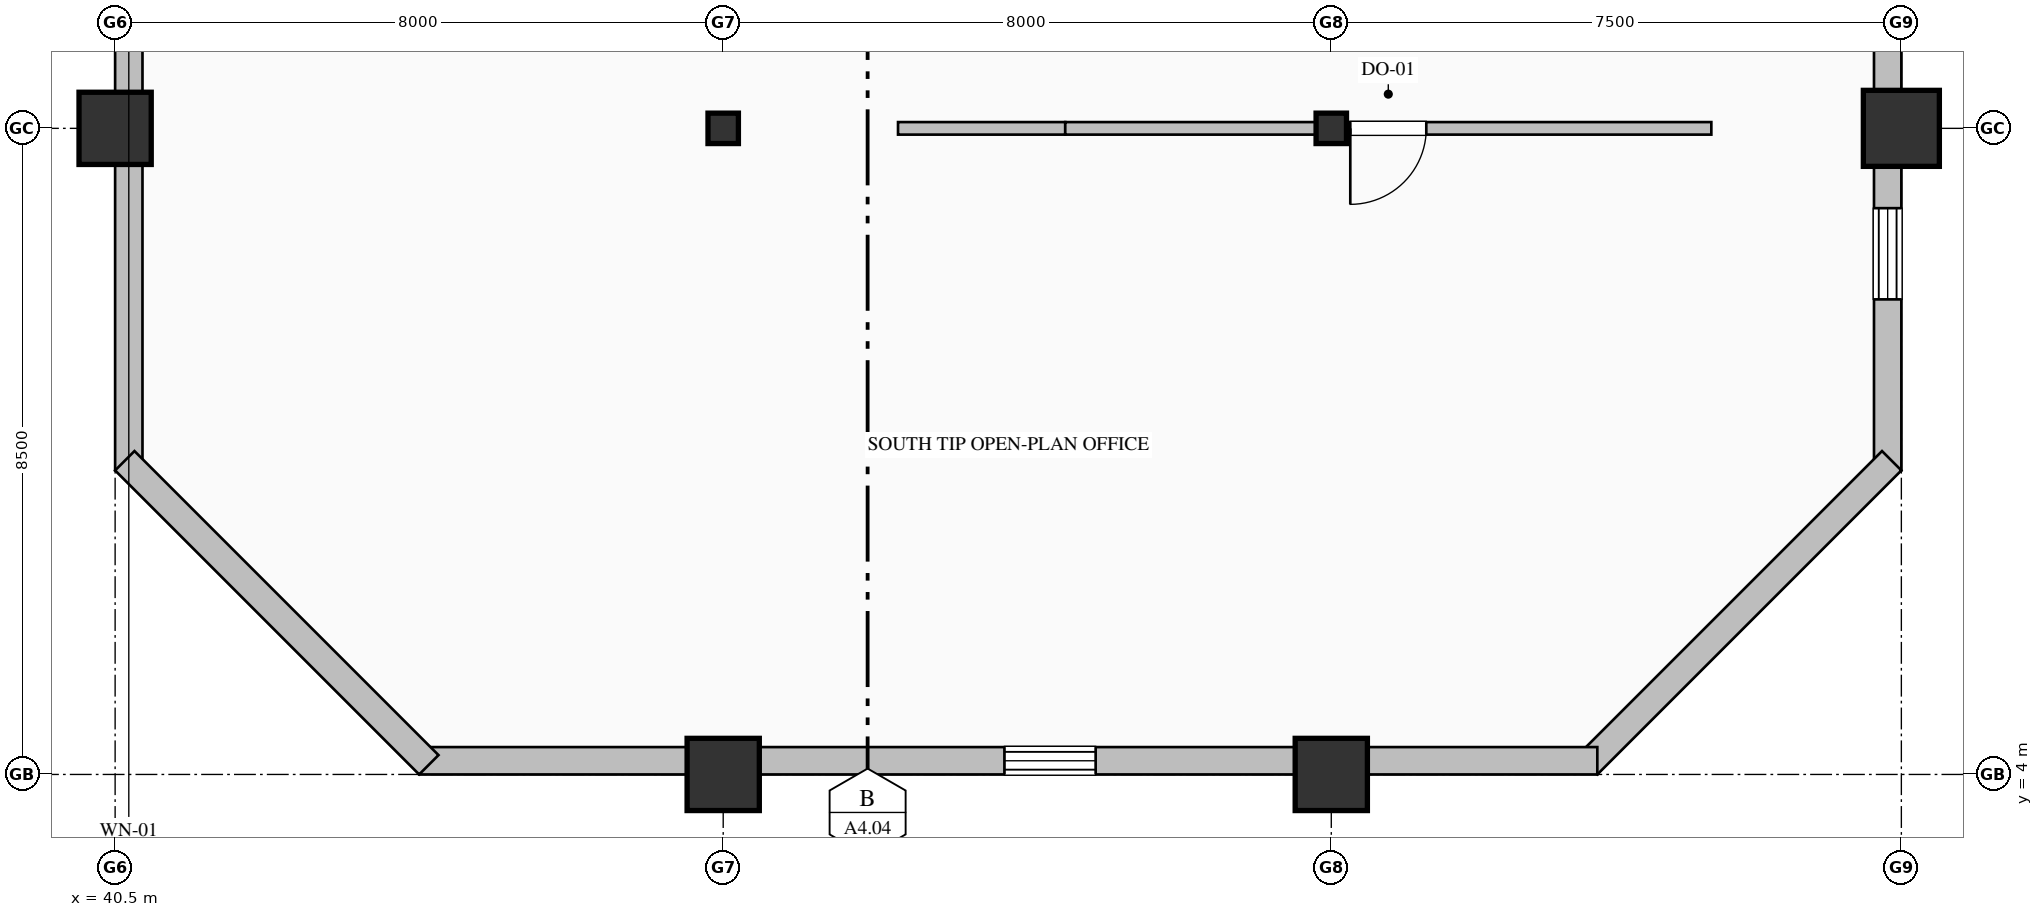
"""IFC4 building model, lengths in metres.
Left out: names, types, materials, properties, quantities, classifications, styles, units other than length and angle.
Written with IfcOpenShell. Run it as: python <this file> out.ifc"""

import sys

from ifc_helpers import new_model, si_unit, direction, frame, frame_2d, origin, origin_2d, place, context, subcontext, project, spatial, rectangle, hollow_rectangle, hollow_circle, i_section, extrude, element, fill, save


model = new_model("IFC4")
c1 = context("Model", 3, precision=1e-05, world=origin(), true_north=direction((0.0, 1.0)))
c2 = subcontext(c1, "Body", "Model", "MODEL_VIEW")
j1 = project(units=[si_unit("LENGTHUNIT", "METRE"), si_unit("PLANEANGLEUNIT", "RADIAN")], contexts=[c1])
p1 = place(None, origin())
s1 = spatial("IfcSite", under=j1, at=p1, CompositionType="ELEMENT")
p2 = place(p1, origin())
s2 = spatial("IfcBuilding", under=s1, at=p2, CompositionType="ELEMENT")
p3 = place(p2, frame((0.0, 0.0, 171.0)))
s3 = spatial("IfcBuildingStorey", under=s2, at=p3, CompositionType="ELEMENT", Elevation=171.0)
for number, where, z_axis, x_axis in (
    (1, (40.5, 12.5, 0.0), (0.0, 0.0, 1.0), (1.0, 0.0, 0.0)),
    (2, (48.5, 4.0, 0.0), (0.0, 0.0, 1.0), (1.0, 0.0, 0.0)),
):
    element("IfcColumn", number, at=place(p3, frame(where, z_axis=z_axis, x_axis=x_axis)), inside=s3, PredefinedType="COLUMN", context=c2, shape_type="SweptSolid", body=[
        extrude(hollow_rectangle(XDim=0.95, YDim=0.95, WallThickness=0.036, at=origin_2d()), origin(), (0.0, 0.0, 1.0), 4.0),
    ])
p4 = place(p3, frame((48.5, 12.5, 0.0), z_axis=(0.0, 0.0, 1.0), x_axis=(1.0, 0.0, 0.0)))
e3 = element("IfcColumn", 3, at=p4, inside=s3, PredefinedType="COLUMN", context=c2, shape_type="SweptSolid", body=[
    extrude(i_section(OverallWidth=0.4, OverallDepth=0.4, WebThickness=0.013, FlangeThickness=0.021, FilletRadius=0.022, at=origin_2d()), origin(), (0.0, 0.0, 1.0), 4.0),
])
p5 = place(p3, frame((56.5, 4.0, 0.0), z_axis=(0.0, 0.0, 1.0), x_axis=(1.0, 0.0, 0.0)))
e4 = element("IfcColumn", 4, at=p5, inside=s3, PredefinedType="COLUMN", context=c2, shape_type="SweptSolid", body=[
    extrude(hollow_rectangle(XDim=0.95, YDim=0.95, WallThickness=0.036, at=origin_2d()), origin(), (0.0, 0.0, 1.0), 4.0),
])
p6 = place(p3, frame((56.5, 12.5, 0.0), z_axis=(0.0, 0.0, 1.0), x_axis=(1.0, 0.0, 0.0)))
e5 = element("IfcColumn", 5, at=p6, inside=s3, PredefinedType="COLUMN", context=c2, shape_type="SweptSolid", body=[
    extrude(i_section(OverallWidth=0.4, OverallDepth=0.4, WebThickness=0.013, FlangeThickness=0.021, FilletRadius=0.022, at=origin_2d()), origin(), (0.0, 0.0, 1.0), 4.0),
])
p7 = place(p3, frame((64.0, 12.5, 0.0), z_axis=(0.0, 0.0, 1.0), x_axis=(1.0, 0.0, 0.0)))
e6 = element("IfcColumn", 6, at=p7, inside=s3, PredefinedType="COLUMN", context=c2, shape_type="SweptSolid", body=[
    extrude(hollow_circle(Radius=0.5, WallThickness=0.036, at=origin_2d()), origin(), (0.0, 0.0, 1.0), 4.0),
])
p8 = place(p3, frame((40.68, 8.0, 0.0), z_axis=(0.0, 0.0, 1.0), x_axis=(0.0, 1.0, 0.0)))
e7 = element("IfcWall", 7, at=p8, inside=s3, PredefinedType="SOLIDWALL", context=c2, shape_type="SweptSolid", body=[
    extrude(rectangle(XDim=20.36, YDim=0.36, at=frame_2d((10.18, 0.0))), origin(), (0.0, 0.0, 1.0), 3.165),
])
p9 = place(p8, frame((13.8, 0.0, 0.7)))
e8 = element("IfcOpeningElement", 8, at=p9, cuts=e7, PredefinedType="OPENING", context=c2, shape_type="SweptSolid", body=[
    extrude(rectangle(XDim=1.2, YDim=1.85, at=frame_2d((0.6, 0.925))), frame((0.0, 0.19, 0.0), z_axis=(0.0, -1.0, 0.0), x_axis=(1.0, 0.0, 0.0)), (0.0, 0.0, 1.0), 0.38),
])
p10 = place(p3, frame((63.82, 36.05, 0.0), z_axis=(0.0, 0.0, 1.0), x_axis=(0.0, -1.0, 0.0)))
e9 = element("IfcWall", 9, at=p10, inside=s3, PredefinedType="SOLIDWALL", context=c2, shape_type="SweptSolid", body=[
    extrude(rectangle(XDim=28.05, YDim=0.36, at=frame_2d((14.025, 0.0))), origin(), (0.0, 0.0, 1.0), 3.265),
])
p11 = place(p10, frame((3.0, 0.0, 0.7)))
e10 = element("IfcOpeningElement", 10, at=p11, cuts=e9, PredefinedType="OPENING", context=c2, shape_type="SweptSolid", body=[
    extrude(rectangle(XDim=1.2, YDim=1.85, at=frame_2d((0.6, 0.925))), frame((0.0, 0.19, 0.0), z_axis=(0.0, -1.0, 0.0), x_axis=(1.0, 0.0, 0.0)), (0.0, 0.0, 1.0), 0.38),
])
p12 = place(p10, frame((13.8, 0.0, 0.7)))
e11 = element("IfcOpeningElement", 11, at=p12, cuts=e9, PredefinedType="OPENING", context=c2, shape_type="SweptSolid", body=[
    extrude(rectangle(XDim=1.2, YDim=1.85, at=frame_2d((0.6, 0.925))), frame((0.0, 0.19, 0.0), z_axis=(0.0, -1.0, 0.0), x_axis=(1.0, 0.0, 0.0)), (0.0, 0.0, 1.0), 0.38),
])
p13 = place(p10, frame((24.6, 0.0, 0.7)))
e12 = element("IfcOpeningElement", 12, at=p13, cuts=e9, PredefinedType="OPENING", context=c2, shape_type="SweptSolid", body=[
    extrude(rectangle(XDim=1.2, YDim=1.85, at=frame_2d((0.6, 0.925))), frame((0.0, 0.19, 0.0), z_axis=(0.0, -1.0, 0.0), x_axis=(1.0, 0.0, 0.0)), (0.0, 0.0, 1.0), 0.38),
])
p14 = place(p3, frame((63.873, 8.127, 0.0), z_axis=(0.0, 0.0, 1.0), x_axis=(-0.707106781187, -0.707106781187, 0.0)))
e13 = element("IfcWall", 13, at=p14, inside=s3, PredefinedType="SOLIDWALL", context=c2, shape_type="SweptSolid", body=[
    extrude(rectangle(XDim=5.657, YDim=0.36, at=frame_2d((2.828, 0.0))), origin(), (0.0, 0.0, 1.0), 3.765),
])
p15 = place(p3, frame((60.0, 4.18, 0.0), z_axis=(0.0, 0.0, 1.0), x_axis=(-1.0, 0.0, 0.0)))
e14 = element("IfcWall", 14, at=p15, inside=s3, PredefinedType="SOLIDWALL", context=c2, shape_type="SweptSolid", body=[
    extrude(rectangle(XDim=15.5, YDim=0.36, at=frame_2d((7.75, 0.0))), origin(), (0.0, 0.0, 1.0), 3.265),
])
p16 = place(p15, frame((6.6, 0.0, 0.7)))
e15 = element("IfcOpeningElement", 15, at=p16, cuts=e14, PredefinedType="OPENING", context=c2, shape_type="SweptSolid", body=[
    extrude(rectangle(XDim=1.2, YDim=1.85, at=frame_2d((0.6, 0.925))), frame((0.0, 0.19, 0.0), z_axis=(0.0, -1.0, 0.0), x_axis=(1.0, 0.0, 0.0)), (0.0, 0.0, 1.0), 0.38),
])
p17 = place(p3, frame((44.627, 4.127, 0.0), z_axis=(0.0, 0.0, 1.0), x_axis=(-0.707106781187, 0.707106781187, 0.0)))
e16 = element("IfcWall", 16, at=p17, inside=s3, PredefinedType="SOLIDWALL", context=c2, shape_type="SweptSolid", body=[
    extrude(rectangle(XDim=5.657, YDim=0.36, at=frame_2d((2.828, 0.0))), origin(), (0.0, 0.0, 1.0), 3.765),
])
p18 = place(p3, frame((53.0, 12.5, 0.0), z_axis=(0.0, 0.0, 1.0), x_axis=(-1.0, 0.0, 0.0)))
e17 = element("IfcWall", 17, at=p18, inside=s3, PredefinedType="PARTITIONING", context=c2, shape_type="SweptSolid", body=[
    extrude(rectangle(XDim=2.2, YDim=0.165, at=frame_2d((1.1, 0.0))), origin(), (0.0, 0.0, 1.0), 3.157),
])
p19 = place(p3, frame((61.5, 12.5, 0.0), z_axis=(0.0, 0.0, 1.0), x_axis=(-1.0, 0.0, 0.0)))
e18 = element("IfcWall", 18, at=p19, inside=s3, PredefinedType="PARTITIONING", context=c2, shape_type="SweptSolid", body=[
    extrude(rectangle(XDim=8.5, YDim=0.165, at=frame_2d((4.25, 0.0))), origin(), (0.0, 0.0, 1.0), 3.157),
])
p20 = place(p19, frame((3.75, 0.0, 0.0)))
e19 = element("IfcOpeningElement", 19, at=p20, cuts=e18, PredefinedType="OPENING", context=c2, shape_type="SweptSolid", body=[
    extrude(rectangle(XDim=1.0, YDim=2.15, at=frame_2d((0.5, 1.075))), frame((0.0, 0.093, 0.0), z_axis=(0.0, -1.0, 0.0), x_axis=(1.0, 0.0, 0.0)), (0.0, 0.0, 1.0), 0.185),
])
p21 = place(p13, origin())
e20 = element("IfcWindow", 20, at=p21, inside=s3, PartitioningType="DOUBLE_PANEL_VERTICAL", PredefinedType="WINDOW", context=c2, shape_type="SweptSolid", body=[
    extrude(rectangle(XDim=1.2, YDim=1.85, at=frame_2d((0.6, 0.925))), frame((0.0, 0.15, 0.0), z_axis=(0.0, -1.0, 0.0), x_axis=(1.0, 0.0, 0.0)), (0.0, 0.0, 1.0), 0.06),
])
fill(e12, e20)
p22 = place(p16, origin())
e21 = element("IfcWindow", 21, at=p22, inside=s3, PartitioningType="DOUBLE_PANEL_VERTICAL", PredefinedType="WINDOW", context=c2, shape_type="SweptSolid", body=[
    extrude(rectangle(XDim=1.2, YDim=1.85, at=frame_2d((0.6, 0.925))), frame((0.0, 0.15, 0.0), z_axis=(0.0, -1.0, 0.0), x_axis=(1.0, 0.0, 0.0)), (0.0, 0.0, 1.0), 0.06),
])
fill(e15, e21)
p23 = place(p20, origin())
e22 = element("IfcDoor", 22, at=p23, inside=s3, OperationType="SINGLE_SWING_RIGHT", PredefinedType="DOOR", context=c2, shape_type="SweptSolid", body=[
    extrude(rectangle(XDim=1.0, YDim=2.15, at=frame_2d((0.5, 1.075))), frame((0.0, 0.025, 0.0), z_axis=(0.0, -1.0, 0.0), x_axis=(1.0, 0.0, 0.0)), (0.0, 0.0, 1.0), 0.05),
])
fill(e19, e22)
save(model, sys.argv[1])
